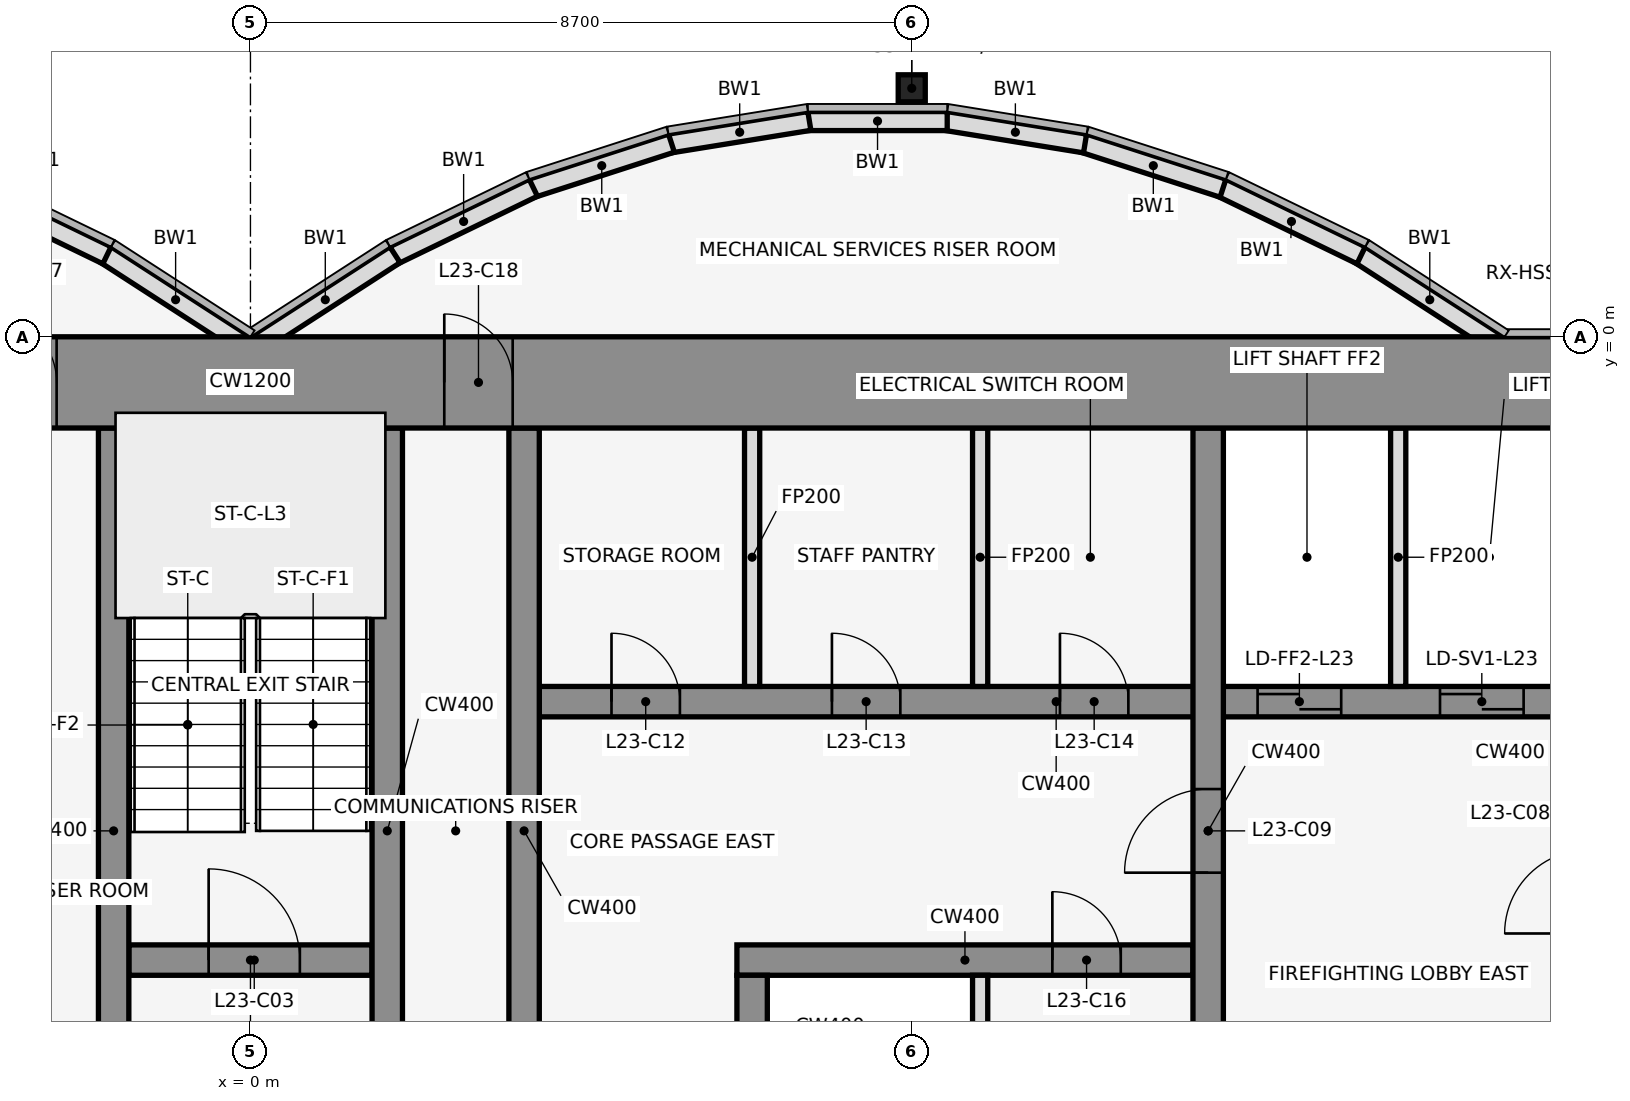
"""IFC4 building model, lengths in metres.
Left out: names, types, materials, properties, quantities, classifications, styles, units other than length and angle.
Written with IfcOpenShell. Run it as: python <this file> out.ifc"""

import sys

from ifc_helpers import new_model, si_unit, direction, frame, frame_2d, origin, origin_2d, place, context, subcontext, project, spatial, rectangle, hollow_rectangle, extrude, element, fill, save


model = new_model("IFC4")
c1 = context("Model", 3, precision=1e-05, world=origin(), true_north=direction((0.0, 1.0)))
c2 = subcontext(c1, "Body", "Model", "MODEL_VIEW")
j1 = project(units=[si_unit("LENGTHUNIT", "METRE"), si_unit("PLANEANGLEUNIT", "RADIAN")], contexts=[c1])
p1 = place(None, origin())
s1 = spatial("IfcSite", under=j1, at=p1, CompositionType="ELEMENT")
p2 = place(p1, origin())
s2 = spatial("IfcBuilding", under=s1, at=p2, CompositionType="ELEMENT")
p3 = place(p2, frame((0.0, 0.0, 110.4)))
s3 = spatial("IfcBuildingStorey", under=s2, at=p3, CompositionType="ELEMENT", Elevation=110.4)
p4 = place(p3, frame((8.7, 3.269, 0.0), z_axis=(0.0, 0.0, 1.0), x_axis=(1.0, 0.0, 0.0)))
e1 = element("IfcColumn", 1, at=p4, inside=s3, PredefinedType="COLUMN", context=c2, shape_type="SweptSolid", body=[
    extrude(hollow_rectangle(XDim=0.356, YDim=0.356, WallThickness=0.012, at=origin_2d()), origin(), (0.0, 0.0, 1.0), 4.1),
])
p5 = place(p3, frame((16.432, -0.105, 0.0), z_axis=(0.0, 0.0, 1.0), x_axis=(-0.83981312244, 0.542875602121, 0.0)))
e2 = element("IfcWall", 2, at=p5, inside=s3, PredefinedType="STANDARD", context=c2, shape_type="SweptSolid", body=[
    extrude(rectangle(XDim=2.183, YDim=0.25, at=frame_2d((1.091, 0.0))), origin(), (0.0, 0.0, 1.0), 3.95),
])
p6 = place(p3, frame((14.612, 1.073, 0.0), z_axis=(0.0, 0.0, 1.0), x_axis=(-0.89982408427, 0.436252928206, 0.0)))
e3 = element("IfcWall", 3, at=p6, inside=s3, PredefinedType="STANDARD", context=c2, shape_type="SweptSolid", body=[
    extrude(rectangle(XDim=2.038, YDim=0.25, at=frame_2d((1.019, 0.0))), origin(), (0.0, 0.0, 1.0), 3.95),
])
p7 = place(p3, frame((12.795, 1.955, 0.0), z_axis=(0.0, 0.0, 1.0), x_axis=(-0.951495806175, 0.307661714928, 0.0)))
e4 = element("IfcWall", 4, at=p7, inside=s3, PredefinedType="STANDARD", context=c2, shape_type="SweptSolid", body=[
    extrude(rectangle(XDim=1.927, YDim=0.25, at=frame_2d((0.963, 0.0))), origin(), (0.0, 0.0, 1.0), 3.95),
])
p8 = place(p3, frame((10.98, 2.543, 0.0), z_axis=(0.0, 0.0, 1.0), x_axis=(-0.987181718931, 0.159600293885, 0.0)))
e5 = element("IfcWall", 5, at=p8, inside=s3, PredefinedType="STANDARD", context=c2, shape_type="SweptSolid", body=[
    extrude(rectangle(XDim=1.857, YDim=0.25, at=frame_2d((0.929, 0.0))), origin(), (0.0, 0.0, 1.0), 3.95),
])
p9 = place(p3, frame((9.167, 2.838, 0.0), z_axis=(0.0, 0.0, 1.0), x_axis=(-1.0, 0.0, 0.0)))
e6 = element("IfcWall", 6, at=p9, inside=s3, PredefinedType="STANDARD", context=c2, shape_type="SweptSolid", body=[
    extrude(rectangle(XDim=1.833, YDim=0.25, at=frame_2d((0.917, 0.0))), origin(), (0.0, 0.0, 1.0), 3.95),
])
p10 = place(p3, frame((7.353, 2.84, 0.0), z_axis=(0.0, 0.0, 1.0), x_axis=(-0.987181718931, -0.159600293885, 0.0)))
e7 = element("IfcWall", 7, at=p10, inside=s3, PredefinedType="STANDARD", context=c2, shape_type="SweptSolid", body=[
    extrude(rectangle(XDim=1.857, YDim=0.25, at=frame_2d((0.929, 0.0))), origin(), (0.0, 0.0, 1.0), 3.95),
])
p11 = place(p3, frame((5.538, 2.548, 0.0), z_axis=(0.0, 0.0, 1.0), x_axis=(-0.951495806175, -0.307661714928, 0.0)))
e8 = element("IfcWall", 8, at=p11, inside=s3, PredefinedType="STANDARD", context=c2, shape_type="SweptSolid", body=[
    extrude(rectangle(XDim=1.927, YDim=0.25, at=frame_2d((0.963, 0.0))), origin(), (0.0, 0.0, 1.0), 3.95),
])
p12 = place(p3, frame((3.721, 1.962, 0.0), z_axis=(0.0, 0.0, 1.0), x_axis=(-0.89982408427, -0.436252928206, 0.0)))
e9 = element("IfcWall", 9, at=p12, inside=s3, PredefinedType="STANDARD", context=c2, shape_type="SweptSolid", body=[
    extrude(rectangle(XDim=2.038, YDim=0.25, at=frame_2d((1.019, 0.0))), origin(), (0.0, 0.0, 1.0), 3.95),
])
for number, where, z_axis, x_axis in (
    (10, (1.901, 1.08, 0.0), (0.0, 0.0, 1.0), (-0.84, -0.543, 0.0)),
    (11, (-0.068, -0.105, 0.0), (0.0, 0.0, 1.0), (-0.84, 0.543, 0.0)),
):
    element("IfcWall", number, at=place(p3, frame(where, z_axis=z_axis, x_axis=x_axis)), inside=s3, PredefinedType="STANDARD", context=c2, shape_type="SweptSolid", body=[
        extrude(rectangle(XDim=2.183, YDim=0.25, at=frame_2d((1.091, 0.0))), origin(), (0.0, 0.0, 1.0), 3.95),
    ])
p13 = place(p3, frame((-1.888, 1.073, 0.0), z_axis=(0.0, 0.0, 1.0), x_axis=(-0.89982408427, 0.436252928206, 0.0)))
e12 = element("IfcWall", 12, at=p13, inside=s3, PredefinedType="STANDARD", context=c2, shape_type="SweptSolid", body=[
    extrude(rectangle(XDim=2.038, YDim=0.25, at=frame_2d((1.019, 0.0))), origin(), (0.0, 0.0, 1.0), 3.95),
])
p14 = place(p3, frame((-1.6, -8.2, 0.0), z_axis=(0.0, 0.0, 1.0), x_axis=(1.0, 0.0, 0.0)))
e13 = element("IfcWall", 13, at=p14, inside=s3, PredefinedType="SHEAR", context=c2, shape_type="SweptSolid", body=[
    extrude(rectangle(XDim=3.2, YDim=0.4, at=frame_2d((1.6, 0.0))), origin(), (0.0, 0.0, 1.0), 4.1),
])
p15 = place(p14, frame((1.05, 0.0, 0.0)))
e14 = element("IfcOpeningElement", 14, at=p15, cuts=e13, PredefinedType="OPENING", context=c2, shape_type="SweptSolid", body=[
    extrude(rectangle(XDim=1.2, YDim=2.1, at=frame_2d((0.6, 1.05))), frame((0.0, 0.212, 0.0), z_axis=(0.0, -1.0, 0.0), x_axis=(1.0, 0.0, 0.0)), (0.0, 0.0, 1.0), 0.424),
])
p16 = place(p3, frame((6.4, -8.2, 0.0), z_axis=(0.0, 0.0, 1.0), x_axis=(1.0, 0.0, 0.0)))
e15 = element("IfcWall", 15, at=p16, inside=s3, PredefinedType="SHEAR", context=c2, shape_type="SweptSolid", body=[
    extrude(rectangle(XDim=6.0, YDim=0.4, at=frame_2d((3.0, 0.0))), origin(), (0.0, 0.0, 1.0), 4.1),
])
p17 = place(p16, frame((4.15, 0.0, 0.0)))
e16 = element("IfcOpeningElement", 16, at=p17, cuts=e15, PredefinedType="OPENING", context=c2, shape_type="SweptSolid", body=[
    extrude(rectangle(XDim=0.9, YDim=2.1, at=frame_2d((0.45, 1.05))), frame((0.0, 0.212, 0.0), z_axis=(0.0, -1.0, 0.0), x_axis=(1.0, 0.0, 0.0)), (0.0, 0.0, 1.0), 0.424),
])
p18 = place(p3, frame((3.8, -4.8, 0.0), z_axis=(0.0, 0.0, 1.0), x_axis=(1.0, 0.0, 0.0)))
e17 = element("IfcWall", 17, at=p18, inside=s3, PredefinedType="SHEAR", context=c2, shape_type="SweptSolid", body=[
    extrude(rectangle(XDim=13.6, YDim=0.4, at=frame_2d((6.8, 0.0))), origin(), (0.0, 0.0, 1.0), 4.1),
])
p19 = place(p18, frame((9.45, 0.0, 0.0)))
e18 = element("IfcOpeningElement", 18, at=p19, cuts=e17, PredefinedType="OPENING", context=c2, shape_type="SweptSolid", body=[
    extrude(rectangle(XDim=1.1, YDim=2.1, at=frame_2d((0.55, 1.05))), frame((0.0, 0.212, 0.0), z_axis=(0.0, -1.0, 0.0), x_axis=(1.0, 0.0, 0.0)), (0.0, 0.0, 1.0), 0.424),
])
p20 = place(p18, frame((11.85, 0.0, 0.0)))
e19 = element("IfcOpeningElement", 19, at=p20, cuts=e17, PredefinedType="OPENING", context=c2, shape_type="SweptSolid", body=[
    extrude(rectangle(XDim=1.1, YDim=2.1, at=frame_2d((0.55, 1.05))), frame((0.0, 0.212, 0.0), z_axis=(0.0, -1.0, 0.0), x_axis=(1.0, 0.0, 0.0)), (0.0, 0.0, 1.0), 0.424),
])
p21 = place(p18, frame((0.95, 0.0, 0.0)))
e20 = element("IfcOpeningElement", 20, at=p21, cuts=e17, PredefinedType="OPENING", context=c2, shape_type="SweptSolid", body=[
    extrude(rectangle(XDim=0.9, YDim=2.1, at=frame_2d((0.45, 1.05))), frame((0.0, 0.212, 0.0), z_axis=(0.0, -1.0, 0.0), x_axis=(1.0, 0.0, 0.0)), (0.0, 0.0, 1.0), 0.424),
])
p22 = place(p18, frame((3.85, 0.0, 0.0)))
e21 = element("IfcOpeningElement", 21, at=p22, cuts=e17, PredefinedType="OPENING", context=c2, shape_type="SweptSolid", body=[
    extrude(rectangle(XDim=0.9, YDim=2.1, at=frame_2d((0.45, 1.05))), frame((0.0, 0.212, 0.0), z_axis=(0.0, -1.0, 0.0), x_axis=(1.0, 0.0, 0.0)), (0.0, 0.0, 1.0), 0.424),
])
p23 = place(p18, frame((6.85, 0.0, 0.0)))
e22 = element("IfcOpeningElement", 22, at=p23, cuts=e17, PredefinedType="OPENING", context=c2, shape_type="SweptSolid", body=[
    extrude(rectangle(XDim=0.9, YDim=2.1, at=frame_2d((0.45, 1.05))), frame((0.0, 0.212, 0.0), z_axis=(0.0, -1.0, 0.0), x_axis=(1.0, 0.0, 0.0)), (0.0, 0.0, 1.0), 0.424),
])
for number, where, z_axis, x_axis in (
    (23, (-1.8, -11.8, 0.0), (0.0, 0.0, 1.0), (0.0, 1.0, 0.0)),
    (24, (1.8, -11.8, 0.0), (0.0, 0.0, 1.0), (0.0, 1.0, 0.0)),
):
    element("IfcWall", number, at=place(p3, frame(where, z_axis=z_axis, x_axis=x_axis)), inside=s3, PredefinedType="SHEAR", context=c2, shape_type="SweptSolid", body=[
        extrude(rectangle(XDim=10.6, YDim=0.4, at=frame_2d((5.3, 0.0))), origin(), (0.0, 0.0, 1.0), 4.1),
    ])
p24 = place(p3, frame((3.6, -11.8, 0.0), z_axis=(0.0, 0.0, 1.0), x_axis=(0.0, 1.0, 0.0)))
e25 = element("IfcWall", 25, at=p24, inside=s3, PredefinedType="SHEAR", context=c2, shape_type="SweptSolid", body=[
    extrude(rectangle(XDim=10.6, YDim=0.4, at=frame_2d((5.3, 0.0))), origin(), (0.0, 0.0, 1.0), 4.1),
])
p25 = place(p24, frame((1.35, 0.0, 0.0)))
e26 = element("IfcOpeningElement", 26, at=p25, cuts=e25, PredefinedType="OPENING", context=c2, shape_type="SweptSolid", body=[
    extrude(rectangle(XDim=0.9, YDim=2.1, at=frame_2d((0.45, 1.05))), frame((0.0, 0.212, 0.0), z_axis=(0.0, -1.0, 0.0), x_axis=(1.0, 0.0, 0.0)), (0.0, 0.0, 1.0), 0.424),
])
p26 = place(p3, frame((6.6, -11.8, 0.0), z_axis=(0.0, 0.0, 1.0), x_axis=(0.0, 1.0, 0.0)))
e27 = element("IfcWall", 27, at=p26, inside=s3, PredefinedType="SHEAR", context=c2, shape_type="SweptSolid", body=[
    extrude(rectangle(XDim=3.4, YDim=0.4, at=frame_2d((1.7, 0.0))), origin(), (0.0, 0.0, 1.0), 4.1),
])
for number, where, z_axis, x_axis in (
    (28, (6.6, -4.6, 0.0), (0.0, 0.0, 1.0), (0.0, 1.0, 0.0)),
    (29, (9.6, -11.8, 0.0), (0.0, 0.0, 1.0), (0.0, 1.0, 0.0)),
    (30, (9.6, -4.6, 0.0), (0.0, 0.0, 1.0), (0.0, 1.0, 0.0)),
):
    element("IfcWall", number, at=place(p3, frame(where, z_axis=z_axis, x_axis=x_axis)), inside=s3, PredefinedType="PARTITIONING", context=c2, shape_type="SweptSolid", body=[
        extrude(rectangle(XDim=3.4, YDim=0.2, at=frame_2d((1.7, 0.0))), origin(), (0.0, 0.0, 1.0), 3.018),
    ])
p27 = place(p3, frame((12.6, -11.8, 0.0), z_axis=(0.0, 0.0, 1.0), x_axis=(0.0, 1.0, 0.0)))
e31 = element("IfcWall", 31, at=p27, inside=s3, PredefinedType="SHEAR", context=c2, shape_type="SweptSolid", body=[
    extrude(rectangle(XDim=10.6, YDim=0.4, at=frame_2d((5.3, 0.0))), origin(), (0.0, 0.0, 1.0), 4.1),
])
p28 = place(p27, frame((4.75, 0.0, 0.0)))
e32 = element("IfcOpeningElement", 32, at=p28, cuts=e31, PredefinedType="OPENING", context=c2, shape_type="SweptSolid", body=[
    extrude(rectangle(XDim=1.1, YDim=2.1, at=frame_2d((0.55, 1.05))), frame((0.0, 0.212, 0.0), z_axis=(0.0, -1.0, 0.0), x_axis=(1.0, 0.0, 0.0)), (0.0, 0.0, 1.0), 0.424),
])
p29 = place(p3, frame((15.1, -4.6, 0.0), z_axis=(0.0, 0.0, 1.0), x_axis=(0.0, 1.0, 0.0)))
e33 = element("IfcWall", 33, at=p29, inside=s3, PredefinedType="PARTITIONING", context=c2, shape_type="SweptSolid", body=[
    extrude(rectangle(XDim=3.4, YDim=0.2, at=frame_2d((1.7, 0.0))), origin(), (0.0, 0.0, 1.0), 3.018),
])
p30 = place(p3, frame((-22.0, -0.6, 0.0), z_axis=(0.0, 0.0, 1.0), x_axis=(1.0, 0.0, 0.0)))
e34 = element("IfcWall", 34, at=p30, inside=s3, PredefinedType="SHEAR", context=c2, shape_type="SweptSolid", body=[
    extrude(rectangle(XDim=44.0, YDim=1.2, at=frame_2d((22.0, 0.0))), origin(), (0.0, 0.0, 1.0), 4.1),
])
p31 = place(p30, frame((18.55, 0.0, 0.0)))
e35 = element("IfcOpeningElement", 35, at=p31, cuts=e34, PredefinedType="OPENING", context=c2, shape_type="SweptSolid", body=[
    extrude(rectangle(XDim=0.9, YDim=2.1, at=frame_2d((0.45, 1.05))), frame((0.0, 0.612, 0.0), z_axis=(0.0, -1.0, 0.0), x_axis=(1.0, 0.0, 0.0)), (0.0, 0.0, 1.0), 1.224),
])
p32 = place(p30, frame((24.55, 0.0, 0.0)))
e36 = element("IfcOpeningElement", 36, at=p32, cuts=e34, PredefinedType="OPENING", context=c2, shape_type="SweptSolid", body=[
    extrude(rectangle(XDim=0.9, YDim=2.1, at=frame_2d((0.45, 1.05))), frame((0.0, 0.612, 0.0), z_axis=(0.0, -1.0, 0.0), x_axis=(1.0, 0.0, 0.0)), (0.0, 0.0, 1.0), 1.224),
])
p33 = place(p15, origin())
e37 = element("IfcDoor", 37, at=p33, inside=s3, OperationType="SINGLE_SWING_LEFT", PredefinedType="DOOR", context=c2, shape_type="SweptSolid", body=[
    extrude(rectangle(XDim=1.2, YDim=2.1, at=frame_2d((0.6, 1.05))), frame((0.0, 0.025, 0.0), z_axis=(0.0, -1.0, 0.0), x_axis=(1.0, 0.0, 0.0)), (0.0, 0.0, 1.0), 0.05),
])
fill(e14, e37)
p34 = place(p19, origin())
e38 = element("IfcDoor", 38, at=p34, inside=s3, OperationType="DOUBLE_DOOR_SLIDING", PredefinedType="DOOR", context=c2, shape_type="SweptSolid", body=[
    extrude(rectangle(XDim=1.1, YDim=2.1, at=frame_2d((0.55, 1.05))), frame((0.0, 0.025, 0.0), z_axis=(0.0, -1.0, 0.0), x_axis=(1.0, 0.0, 0.0)), (0.0, 0.0, 1.0), 0.05),
])
fill(e18, e38)
p35 = place(p20, origin())
e39 = element("IfcDoor", 39, at=p35, inside=s3, OperationType="DOUBLE_DOOR_SLIDING", PredefinedType="DOOR", context=c2, shape_type="SweptSolid", body=[
    extrude(rectangle(XDim=1.1, YDim=2.1, at=frame_2d((0.55, 1.05))), frame((0.0, 0.025, 0.0), z_axis=(0.0, -1.0, 0.0), x_axis=(1.0, 0.0, 0.0)), (0.0, 0.0, 1.0), 0.05),
])
fill(e19, e39)
p36 = place(p28, frame((1.1, 0.0, 0.0), z_axis=(0.0, 0.0, 1.0), x_axis=(-1.0, 0.0, 0.0)))
e40 = element("IfcDoor", 40, at=p36, inside=s3, OperationType="SINGLE_SWING_RIGHT", PredefinedType="DOOR", context=c2, shape_type="SweptSolid", body=[
    extrude(rectangle(XDim=1.1, YDim=2.1, at=frame_2d((0.55, 1.05))), frame((0.0, 0.025, 0.0), z_axis=(0.0, -1.0, 0.0), x_axis=(1.0, 0.0, 0.0)), (0.0, 0.0, 1.0), 0.05),
])
fill(e32, e40)
p37 = place(p21, origin())
e41 = element("IfcDoor", 41, at=p37, inside=s3, OperationType="SINGLE_SWING_RIGHT", PredefinedType="DOOR", context=c2, shape_type="SweptSolid", body=[
    extrude(rectangle(XDim=0.9, YDim=2.1, at=frame_2d((0.45, 1.05))), frame((0.0, 0.025, 0.0), z_axis=(0.0, -1.0, 0.0), x_axis=(1.0, 0.0, 0.0)), (0.0, 0.0, 1.0), 0.05),
])
fill(e20, e41)
p38 = place(p22, origin())
e42 = element("IfcDoor", 42, at=p38, inside=s3, OperationType="SINGLE_SWING_LEFT", PredefinedType="DOOR", context=c2, shape_type="SweptSolid", body=[
    extrude(rectangle(XDim=0.9, YDim=2.1, at=frame_2d((0.45, 1.05))), frame((0.0, 0.025, 0.0), z_axis=(0.0, -1.0, 0.0), x_axis=(1.0, 0.0, 0.0)), (0.0, 0.0, 1.0), 0.05),
])
fill(e21, e42)
p39 = place(p23, origin())
e43 = element("IfcDoor", 43, at=p39, inside=s3, OperationType="SINGLE_SWING_RIGHT", PredefinedType="DOOR", context=c2, shape_type="SweptSolid", body=[
    extrude(rectangle(XDim=0.9, YDim=2.1, at=frame_2d((0.45, 1.05))), frame((0.0, 0.025, 0.0), z_axis=(0.0, -1.0, 0.0), x_axis=(1.0, 0.0, 0.0)), (0.0, 0.0, 1.0), 0.05),
])
fill(e22, e43)
p40 = place(p17, frame((0.9, 0.0, 0.0), z_axis=(0.0, 0.0, 1.0), x_axis=(-1.0, 0.0, 0.0)))
e44 = element("IfcDoor", 44, at=p40, inside=s3, OperationType="SINGLE_SWING_LEFT", PredefinedType="DOOR", context=c2, shape_type="SweptSolid", body=[
    extrude(rectangle(XDim=0.9, YDim=2.1, at=frame_2d((0.45, 1.05))), frame((0.0, 0.025, 0.0), z_axis=(0.0, -1.0, 0.0), x_axis=(1.0, 0.0, 0.0)), (0.0, 0.0, 1.0), 0.05),
])
fill(e16, e44)
p41 = place(p31, origin())
e45 = element("IfcDoor", 45, at=p41, inside=s3, OperationType="SINGLE_SWING_LEFT", PredefinedType="DOOR", context=c2, shape_type="SweptSolid", body=[
    extrude(rectangle(XDim=0.9, YDim=2.1, at=frame_2d((0.45, 1.05))), frame((0.0, 0.025, 0.0), z_axis=(0.0, -1.0, 0.0), x_axis=(1.0, 0.0, 0.0)), (0.0, 0.0, 1.0), 0.05),
])
fill(e35, e45)
p42 = place(p32, origin())
e46 = element("IfcDoor", 46, at=p42, inside=s3, OperationType="SINGLE_SWING_LEFT", PredefinedType="DOOR", context=c2, shape_type="SweptSolid", body=[
    extrude(rectangle(XDim=0.9, YDim=2.1, at=frame_2d((0.45, 1.05))), frame((0.0, 0.025, 0.0), z_axis=(0.0, -1.0, 0.0), x_axis=(1.0, 0.0, 0.0)), (0.0, 0.0, 1.0), 0.05),
])
fill(e36, e46)
save(model, sys.argv[1])
